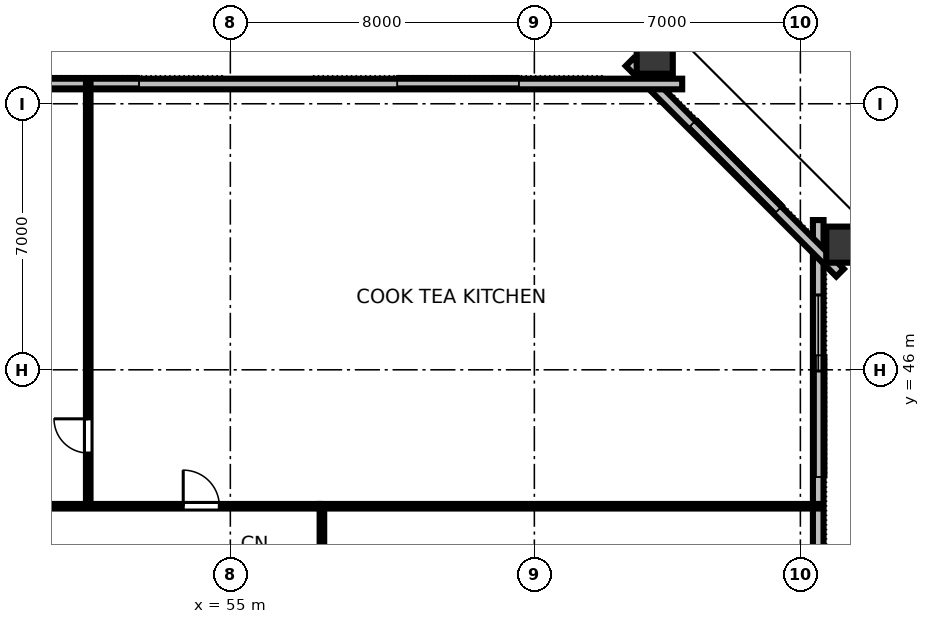
"""IFC4 building model, lengths in metres.
Left out: names, types, materials, properties, quantities, classifications, styles, units other than length and angle.
Written with IfcOpenShell. Run it as: python <this file> out.ifc"""

import sys

from ifc_helpers import new_model, si_unit, direction, frame, frame_2d, origin, origin_2d, place, context, subcontext, project, spatial, rectangle, hollow_rectangle, extrude, element, fill, save


model = new_model("IFC4")
c1 = context("Model", 3, precision=1e-05, world=origin(), true_north=direction((0.0, 1.0)))
c2 = subcontext(c1, "Body", "Model", "MODEL_VIEW")
j1 = project(units=[si_unit("LENGTHUNIT", "METRE"), si_unit("PLANEANGLEUNIT", "RADIAN")], contexts=[c1])
p1 = place(None, origin())
s1 = spatial("IfcSite", under=j1, at=p1, CompositionType="ELEMENT")
p2 = place(p1, origin())
s2 = spatial("IfcBuilding", under=s1, at=p2, CompositionType="ELEMENT")
p3 = place(p2, frame((0.0, 0.0, 60.4)))
s3 = spatial("IfcBuildingStorey", under=s2, at=p3, CompositionType="ELEMENT", Elevation=60.4)
for number, where, z_axis, x_axis in (
    (1, (71.256, 49.293, 0.0), (0.0, 0.0, 1.0), (0.0, 1.0, 0.0)),
    (2, (66.168, 54.365, 0.0), (0.0, 0.0, 1.0), (1.0, 0.0, 0.0)),
):
    element("IfcColumn", number, at=place(p3, frame(where, z_axis=z_axis, x_axis=x_axis)), inside=s3, PredefinedType="COLUMN", context=c2, shape_type="SweptSolid", body=[
        extrude(hollow_rectangle(XDim=0.95, YDim=1.15, WallThickness=0.06, at=origin_2d()), origin(), (0.0, 0.0, 1.0), 3.358),
    ])
p4 = place(p3, frame((70.47, 14.06, 0.0), z_axis=(0.0, 0.0, 1.0), x_axis=(0.0, 1.0, 0.0)))
e3 = element("IfcWall", 3, at=p4, inside=s3, PredefinedType="STANDARD", context=c2, shape_type="SweptSolid", body=[
    extrude(rectangle(XDim=35.88, YDim=0.28, at=frame_2d((17.94, 0.0))), origin(), (0.0, 0.0, 1.0), 3.36),
])
p5 = place(p4, frame((19.29, 0.0, 0.0)))
e4 = element("IfcOpeningElement", 4, at=p5, cuts=e3, PredefinedType="OPENING", context=c2, shape_type="SweptSolid", body=[
    extrude(rectangle(XDim=1.4, YDim=2.15, at=frame_2d((0.7, 1.075))), frame((0.0, 0.15, 0.0), z_axis=(0.0, -1.0, 0.0), x_axis=(1.0, 0.0, 0.0)), (0.0, 0.0, 1.0), 0.3),
])
p6 = place(p4, frame((1.971, 0.0, 0.8)))
e5 = element("IfcOpeningElement", 5, at=p6, cuts=e3, PredefinedType="OPENING", context=c2, shape_type="SweptSolid", body=[
    extrude(rectangle(XDim=2.0, YDim=1.95, at=frame_2d((1.0, 0.975))), frame((0.0, 0.15, 0.0), z_axis=(0.0, -1.0, 0.0), x_axis=(1.0, 0.0, 0.0)), (0.0, 0.0, 1.0), 0.3),
])
p7 = place(p4, frame((9.456, 0.0, 0.8)))
e6 = element("IfcOpeningElement", 6, at=p7, cuts=e3, PredefinedType="OPENING", context=c2, shape_type="SweptSolid", body=[
    extrude(rectangle(XDim=2.0, YDim=1.95, at=frame_2d((1.0, 0.975))), frame((0.0, 0.15, 0.0), z_axis=(0.0, -1.0, 0.0), x_axis=(1.0, 0.0, 0.0)), (0.0, 0.0, 1.0), 0.3),
])
p8 = place(p4, frame((24.424, 0.0, 0.8)))
e7 = element("IfcOpeningElement", 7, at=p8, cuts=e3, PredefinedType="OPENING", context=c2, shape_type="SweptSolid", body=[
    extrude(rectangle(XDim=2.0, YDim=1.95, at=frame_2d((1.0, 0.975))), frame((0.0, 0.15, 0.0), z_axis=(0.0, -1.0, 0.0), x_axis=(1.0, 0.0, 0.0)), (0.0, 0.0, 1.0), 0.3),
])
p9 = place(p4, frame((31.909, 0.0, 0.8)))
e8 = element("IfcOpeningElement", 8, at=p9, cuts=e3, PredefinedType="OPENING", context=c2, shape_type="SweptSolid", body=[
    extrude(rectangle(XDim=2.0, YDim=1.95, at=frame_2d((1.0, 0.975))), frame((0.0, 0.15, 0.0), z_axis=(0.0, -1.0, 0.0), x_axis=(1.0, 0.0, 0.0)), (0.0, 0.0, 1.0), 0.3),
])
p10 = place(p3, frame((71.044, 48.554, 0.0), z_axis=(0.0, 0.0, 1.0), x_axis=(-0.707106781187, 0.707106781187, 0.0)))
e9 = element("IfcWall", 9, at=p10, inside=s3, PredefinedType="STANDARD", context=c2, shape_type="SweptSolid", body=[
    extrude(rectangle(XDim=7.834, YDim=0.28, at=frame_2d((3.917, 0.0))), origin(), (0.0, 0.0, 1.0), 3.36),
])
p11 = place(p3, frame((66.89, 53.52, 0.0), z_axis=(0.0, 0.0, 1.0), x_axis=(-1.0, 0.0, 0.0)))
e10 = element("IfcWall", 10, at=p11, inside=s3, PredefinedType="STANDARD", context=c2, shape_type="SweptSolid", body=[
    extrude(rectangle(XDim=41.78, YDim=0.28, at=frame_2d((20.89, 0.0))), origin(), (0.0, 0.0, 1.0), 3.36),
])
p12 = place(p3, frame((51.261, 42.41, 0.0), z_axis=(0.0, 0.0, 1.0), x_axis=(0.0, 1.0, 0.0)))
e11 = element("IfcWall", 11, at=p12, inside=s3, PredefinedType="PARTITIONING", context=c2, shape_type="SweptSolid", body=[
    extrude(rectangle(XDim=11.11, YDim=0.12, at=frame_2d((5.555, 0.0))), origin(), (0.0, 0.0, 1.0), 2.64),
])
p13 = place(p12, frame((1.4, 0.0, 0.0)))
e12 = element("IfcOpeningElement", 12, at=p13, cuts=e11, PredefinedType="OPENING", context=c2, shape_type="SweptSolid", body=[
    extrude(rectangle(XDim=0.9, YDim=2.15, at=frame_2d((0.45, 1.075))), frame((0.0, 0.07, 0.0), z_axis=(0.0, -1.0, 0.0), x_axis=(1.0, 0.0, 0.0)), (0.0, 0.0, 1.0), 0.14),
])
p14 = place(p3, frame((34.65, 42.41, 0.0), z_axis=(0.0, 0.0, 1.0), x_axis=(1.0, 0.0, 0.0)))
e13 = element("IfcWall", 13, at=p14, inside=s3, PredefinedType="PARTITIONING", context=c2, shape_type="SweptSolid", body=[
    extrude(rectangle(XDim=22.7, YDim=0.12, at=frame_2d((11.35, 0.0))), origin(), (0.0, 0.0, 1.0), 2.64),
])
p15 = place(p14, frame((2.59, 0.0, 0.0)))
e14 = element("IfcOpeningElement", 14, at=p15, cuts=e13, PredefinedType="OPENING", context=c2, shape_type="SweptSolid", body=[
    extrude(rectangle(XDim=0.95, YDim=2.15, at=frame_2d((0.475, 1.075))), frame((0.0, 0.07, 0.0), z_axis=(0.0, -1.0, 0.0), x_axis=(1.0, 0.0, 0.0)), (0.0, 0.0, 1.0), 0.14),
])
p16 = place(p14, frame((8.768, 0.0, 0.0)))
e15 = element("IfcOpeningElement", 15, at=p16, cuts=e13, PredefinedType="OPENING", context=c2, shape_type="SweptSolid", body=[
    extrude(rectangle(XDim=0.95, YDim=2.15, at=frame_2d((0.475, 1.075))), frame((0.0, 0.07, 0.0), z_axis=(0.0, -1.0, 0.0), x_axis=(1.0, 0.0, 0.0)), (0.0, 0.0, 1.0), 0.14),
])
p17 = place(p14, frame((14.079, 0.0, 0.0)))
e16 = element("IfcOpeningElement", 16, at=p17, cuts=e13, PredefinedType="OPENING", context=c2, shape_type="SweptSolid", body=[
    extrude(rectangle(XDim=0.95, YDim=2.15, at=frame_2d((0.475, 1.075))), frame((0.0, 0.07, 0.0), z_axis=(0.0, -1.0, 0.0), x_axis=(1.0, 0.0, 0.0)), (0.0, 0.0, 1.0), 0.14),
])
p18 = place(p14, frame((19.11, 0.0, 0.0)))
e17 = element("IfcOpeningElement", 17, at=p18, cuts=e13, PredefinedType="OPENING", context=c2, shape_type="SweptSolid", body=[
    extrude(rectangle(XDim=0.95, YDim=2.15, at=frame_2d((0.475, 1.075))), frame((0.0, 0.07, 0.0), z_axis=(0.0, -1.0, 0.0), x_axis=(1.0, 0.0, 0.0)), (0.0, 0.0, 1.0), 0.14),
])
p19 = place(p3, frame((57.41, 21.65, 0.0), z_axis=(0.0, 0.0, 1.0), x_axis=(0.0, 1.0, 0.0)))
e18 = element("IfcWall", 18, at=p19, inside=s3, PredefinedType="PARTITIONING", context=c2, shape_type="SweptSolid", body=[
    extrude(rectangle(XDim=20.7, YDim=0.12, at=frame_2d((10.35, 0.0))), origin(), (0.0, 0.0, 1.0), 2.64),
])
p20 = place(p19, frame((3.502, 0.0, 0.0)))
e19 = element("IfcOpeningElement", 19, at=p20, cuts=e18, PredefinedType="OPENING", context=c2, shape_type="SweptSolid", body=[
    extrude(rectangle(XDim=0.95, YDim=2.15, at=frame_2d((0.475, 1.075))), frame((0.0, 0.07, 0.0), z_axis=(0.0, -1.0, 0.0), x_axis=(1.0, 0.0, 0.0)), (0.0, 0.0, 1.0), 0.14),
])
p21 = place(p19, frame((13.652, 0.0, 0.0)))
e20 = element("IfcOpeningElement", 20, at=p21, cuts=e18, PredefinedType="OPENING", context=c2, shape_type="SweptSolid", body=[
    extrude(rectangle(XDim=0.95, YDim=2.15, at=frame_2d((0.475, 1.075))), frame((0.0, 0.07, 0.0), z_axis=(0.0, -1.0, 0.0), x_axis=(1.0, 0.0, 0.0)), (0.0, 0.0, 1.0), 0.14),
])
p22 = place(p3, frame((57.35, 42.41, 0.0), z_axis=(0.0, 0.0, 1.0), x_axis=(1.0, 0.0, 0.0)))
e21 = element("IfcWall", 21, at=p22, inside=s3, PredefinedType="PARTITIONING", context=c2, shape_type="SweptSolid", body=[
    extrude(rectangle(XDim=13.12, YDim=0.12, at=frame_2d((6.56, 0.0))), origin(), (0.0, 0.0, 1.0), 2.64),
])
p23 = place(p9, origin())
e22 = element("IfcWindow", 22, at=p23, inside=s3, PartitioningType="SINGLE_PANEL", PredefinedType="WINDOW", context=c2, shape_type="SweptSolid", body=[
    extrude(rectangle(XDim=2.0, YDim=1.95, at=frame_2d((1.0, 0.975))), frame((0.0, 0.03, 0.0), z_axis=(0.0, -1.0, 0.0), x_axis=(1.0, 0.0, 0.0)), (0.0, 0.0, 1.0), 0.06),
])
fill(e8, e22)
p24 = place(p13, origin())
e23 = element("IfcDoor", 23, at=p24, inside=s3, OperationType="SINGLE_SWING_RIGHT", PredefinedType="DOOR", context=c2, shape_type="SweptSolid", body=[
    extrude(rectangle(XDim=0.9, YDim=2.15, at=frame_2d((0.45, 1.075))), frame((0.0, 0.025, 0.0), z_axis=(0.0, -1.0, 0.0), x_axis=(1.0, 0.0, 0.0)), (0.0, 0.0, 1.0), 0.05),
])
fill(e12, e23)
p25 = place(p18, origin())
e24 = element("IfcDoor", 24, at=p25, inside=s3, OperationType="SINGLE_SWING_LEFT", PredefinedType="DOOR", context=c2, shape_type="SweptSolid", body=[
    extrude(rectangle(XDim=0.95, YDim=2.15, at=frame_2d((0.475, 1.075))), frame((0.0, 0.025, 0.0), z_axis=(0.0, -1.0, 0.0), x_axis=(1.0, 0.0, 0.0)), (0.0, 0.0, 1.0), 0.05),
])
fill(e17, e24)
save(model, sys.argv[1])
